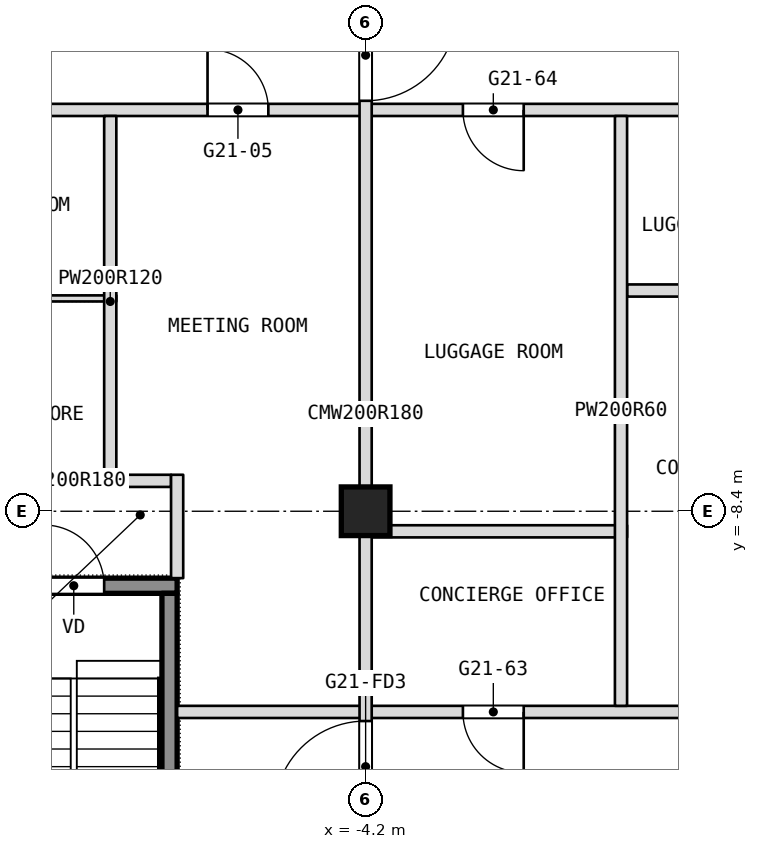
"""IFC4 building model, lengths in metres.
Left out: names, types, materials, properties, quantities, classifications, styles, units other than length and angle.
Written with IfcOpenShell. Run it as: python <this file> out.ifc"""

import sys

from ifc_helpers import new_model, si_unit, direction, frame, frame_2d, origin, origin_2d, place, context, subcontext, project, spatial, rectangle, extrude, element, fill, save


model = new_model("IFC4")
c1 = context("Model", 3, precision=1e-05, world=origin(), true_north=direction((0.0, 1.0)))
c2 = subcontext(c1, "Body", "Model", "MODEL_VIEW")
j1 = project(units=[si_unit("LENGTHUNIT", "METRE"), si_unit("PLANEANGLEUNIT", "RADIAN")], contexts=[c1])
p1 = place(None, origin())
s1 = spatial("IfcSite", under=j1, at=p1, CompositionType="ELEMENT")
p2 = place(p1, origin())
s2 = spatial("IfcBuilding", under=s1, at=p2, CompositionType="ELEMENT")
p3 = place(p2, frame((0.0, 0.0, 245.3)))
s3 = spatial("IfcBuildingStorey", under=s2, at=p3, CompositionType="ELEMENT", Elevation=245.3)
p4 = place(p3, frame((-4.2, -8.4, 0.0), z_axis=(0.0, 0.0, 1.0), x_axis=(1.0, 0.0, 0.0)))
e1 = element("IfcColumn", 1, at=p4, inside=s3, PredefinedType="COLUMN", context=c2, shape_type="SweptSolid", body=[
    extrude(rectangle(XDim=0.8, YDim=0.8, at=origin_2d()), origin(), (0.0, 0.0, 1.0), 3.6),
])
p5 = place(p3, frame((-7.3, -11.7, 0.0), z_axis=(0.0, 0.0, 1.0), x_axis=(1.0, 0.0, 0.0)))
e2 = element("IfcWall", 2, at=p5, inside=s3, PredefinedType="PARTITIONING", context=c2, shape_type="SweptSolid", body=[
    extrude(rectangle(XDim=14.6, YDim=0.2, at=frame_2d((7.3, 0.0))), origin(), (0.0, 0.0, 1.0), 3.34),
])
p6 = place(p5, frame((4.7, 0.0, 0.0)))
e3 = element("IfcOpeningElement", 3, at=p6, cuts=e2, PredefinedType="OPENING", context=c2, shape_type="SweptSolid", body=[
    extrude(rectangle(XDim=1.0, YDim=2.1, at=frame_2d((0.5, 1.05))), frame((0.0, 0.1, 0.0), z_axis=(0.0, -1.0, 0.0), x_axis=(1.0, 0.0, 0.0)), (0.0, 0.0, 1.0), 0.2),
])
p7 = place(p5, frame((8.9, 0.0, 0.0)))
e4 = element("IfcOpeningElement", 4, at=p7, cuts=e2, PredefinedType="OPENING", context=c2, shape_type="SweptSolid", body=[
    extrude(rectangle(XDim=1.0, YDim=2.1, at=frame_2d((0.5, 1.05))), frame((0.0, 0.1, 0.0), z_axis=(0.0, -1.0, 0.0), x_axis=(1.0, 0.0, 0.0)), (0.0, 0.0, 1.0), 0.2),
])
p8 = place(p3, frame((-4.1, -8.73, 0.0), z_axis=(0.0, 0.0, 1.0), x_axis=(1.0, 0.0, 0.0)))
e5 = element("IfcWall", 5, at=p8, inside=s3, PredefinedType="PARTITIONING", context=c2, shape_type="SweptSolid", body=[
    extrude(rectangle(XDim=4.2, YDim=0.2, at=frame_2d((2.1, 0.0))), origin(), (0.0, 0.0, 1.0), 3.34),
])
p9 = place(p3, frame((-10.6, -7.9, 0.0), z_axis=(0.0, 0.0, 1.0), x_axis=(1.0, 0.0, 0.0)))
e6 = element("IfcWall", 6, at=p9, inside=s3, PredefinedType="PARTITIONING", context=c2, shape_type="SweptSolid", body=[
    extrude(rectangle(XDim=3.2, YDim=0.2, at=frame_2d((1.6, 0.0))), origin(), (0.0, 0.0, 1.0), 3.34),
])
p10 = place(p3, frame((-12.5, -4.9, 0.0), z_axis=(0.0, 0.0, 1.0), x_axis=(1.0, 0.0, 0.0)))
e7 = element("IfcWall", 7, at=p10, inside=s3, PredefinedType="PARTITIONING", context=c2, shape_type="SweptSolid", body=[
    extrude(rectangle(XDim=4.2, YDim=0.1, at=frame_2d((2.1, 0.0))), origin(), (0.0, 0.0, 1.0), 3.34),
])
p11 = place(p10, frame((1.55, 0.0, 0.0)))
e8 = element("IfcOpeningElement", 8, at=p11, cuts=e7, PredefinedType="OPENING", context=c2, shape_type="SweptSolid", body=[
    extrude(rectangle(XDim=0.9, YDim=2.1, at=frame_2d((0.45, 1.05))), frame((0.0, 0.05, 0.0), z_axis=(0.0, -1.0, 0.0), x_axis=(1.0, 0.0, 0.0)), (0.0, 0.0, 1.0), 0.1),
])
p12 = place(p3, frame((0.1, -4.77, 0.0), z_axis=(0.0, 0.0, 1.0), x_axis=(1.0, 0.0, 0.0)))
e9 = element("IfcWall", 9, at=p12, inside=s3, PredefinedType="PARTITIONING", context=c2, shape_type="SweptSolid", body=[
    extrude(rectangle(XDim=4.0, YDim=0.2, at=frame_2d((2.0, 0.0))), origin(), (0.0, 0.0, 1.0), 3.34),
])
p13 = place(p3, frame((-16.9, -1.8, 0.0), z_axis=(0.0, 0.0, 1.0), x_axis=(1.0, 0.0, 0.0)))
e10 = element("IfcWall", 10, at=p13, inside=s3, PredefinedType="PARTITIONING", context=c2, shape_type="SweptSolid", body=[
    extrude(rectangle(XDim=33.8, YDim=0.2, at=frame_2d((16.9, 0.0))), origin(), (0.0, 0.0, 1.0), 3.34),
])
p14 = place(p13, frame((1.7, 0.0, 0.0)))
e11 = element("IfcOpeningElement", 11, at=p14, cuts=e10, PredefinedType="OPENING", context=c2, shape_type="SweptSolid", body=[
    extrude(rectangle(XDim=1.0, YDim=2.1, at=frame_2d((0.5, 1.05))), frame((0.0, 0.1, 0.0), z_axis=(0.0, -1.0, 0.0), x_axis=(1.0, 0.0, 0.0)), (0.0, 0.0, 1.0), 0.2),
])
p15 = place(p13, frame((5.9, 0.0, 0.0)))
e12 = element("IfcOpeningElement", 12, at=p15, cuts=e10, PredefinedType="OPENING", context=c2, shape_type="SweptSolid", body=[
    extrude(rectangle(XDim=1.0, YDim=2.1, at=frame_2d((0.5, 1.05))), frame((0.0, 0.1, 0.0), z_axis=(0.0, -1.0, 0.0), x_axis=(1.0, 0.0, 0.0)), (0.0, 0.0, 1.0), 0.2),
])
p16 = place(p13, frame((10.1, 0.0, 0.0)))
e13 = element("IfcOpeningElement", 13, at=p16, cuts=e10, PredefinedType="OPENING", context=c2, shape_type="SweptSolid", body=[
    extrude(rectangle(XDim=1.0, YDim=2.1, at=frame_2d((0.5, 1.05))), frame((0.0, 0.1, 0.0), z_axis=(0.0, -1.0, 0.0), x_axis=(1.0, 0.0, 0.0)), (0.0, 0.0, 1.0), 0.2),
])
p17 = place(p13, frame((24.4, 0.0, 0.0)))
e14 = element("IfcOpeningElement", 14, at=p17, cuts=e10, PredefinedType="OPENING", context=c2, shape_type="SweptSolid", body=[
    extrude(rectangle(XDim=1.8, YDim=2.1, at=frame_2d((0.9, 1.05))), frame((0.0, 0.1, 0.0), z_axis=(0.0, -1.0, 0.0), x_axis=(1.0, 0.0, 0.0)), (0.0, 0.0, 1.0), 0.2),
])
p18 = place(p13, frame((31.1, 0.0, 0.0)))
e15 = element("IfcOpeningElement", 15, at=p18, cuts=e10, PredefinedType="OPENING", context=c2, shape_type="SweptSolid", body=[
    extrude(rectangle(XDim=1.0, YDim=2.1, at=frame_2d((0.5, 1.05))), frame((0.0, 0.1, 0.0), z_axis=(0.0, -1.0, 0.0), x_axis=(1.0, 0.0, 0.0)), (0.0, 0.0, 1.0), 0.2),
])
p19 = place(p13, frame((14.3, 0.0, 0.0)))
e16 = element("IfcOpeningElement", 16, at=p19, cuts=e10, PredefinedType="OPENING", context=c2, shape_type="SweptSolid", body=[
    extrude(rectangle(XDim=1.0, YDim=2.1, at=frame_2d((0.5, 1.05))), frame((0.0, 0.1, 0.0), z_axis=(0.0, -1.0, 0.0), x_axis=(1.0, 0.0, 0.0)), (0.0, 0.0, 1.0), 0.2),
])
p20 = place(p13, frame((18.5, 0.0, 0.0)))
e17 = element("IfcOpeningElement", 17, at=p20, cuts=e10, PredefinedType="OPENING", context=c2, shape_type="SweptSolid", body=[
    extrude(rectangle(XDim=1.0, YDim=2.1, at=frame_2d((0.5, 1.05))), frame((0.0, 0.1, 0.0), z_axis=(0.0, -1.0, 0.0), x_axis=(1.0, 0.0, 0.0)), (0.0, 0.0, 1.0), 0.2),
])
p21 = place(p3, frame((0.0, -11.6, 0.0), z_axis=(0.0, 0.0, 1.0), x_axis=(0.0, 1.0, 0.0)))
e18 = element("IfcWall", 18, at=p21, inside=s3, PredefinedType="PARTITIONING", context=c2, shape_type="SweptSolid", body=[
    extrude(rectangle(XDim=9.7, YDim=0.2, at=frame_2d((4.85, 0.0))), origin(), (0.0, 0.0, 1.0), 3.34),
])
p22 = place(p3, frame((-4.2, -13.6, 0.0), z_axis=(0.0, 0.0, 1.0), x_axis=(0.0, 1.0, 0.0)))
e19 = element("IfcWall", 19, at=p22, inside=s3, PredefinedType="PARTITIONING", context=c2, shape_type="SweptSolid", body=[
    extrude(rectangle(XDim=13.6, YDim=0.2, at=frame_2d((6.8, 0.0))), origin(), (0.0, 0.0, 1.0), 3.34),
])
p23 = place(p22, frame((11.95, 0.0, 0.0)))
e20 = element("IfcOpeningElement", 20, at=p23, cuts=e19, PredefinedType="OPENING", context=c2, shape_type="SweptSolid", body=[
    extrude(rectangle(XDim=1.5, YDim=2.1, at=frame_2d((0.75, 1.05))), frame((0.0, 0.1, 0.0), z_axis=(0.0, -1.0, 0.0), x_axis=(1.0, 0.0, 0.0)), (0.0, 0.0, 1.0), 0.2),
])
p24 = place(p22, frame((0.25, 0.0, 0.0)))
e21 = element("IfcOpeningElement", 21, at=p24, cuts=e19, PredefinedType="OPENING", context=c2, shape_type="SweptSolid", body=[
    extrude(rectangle(XDim=1.5, YDim=2.1, at=frame_2d((0.75, 1.05))), frame((0.0, 0.1, 0.0), z_axis=(0.0, -1.0, 0.0), x_axis=(1.0, 0.0, 0.0)), (0.0, 0.0, 1.0), 0.2),
])
p25 = place(p3, frame((-7.3, -9.5, 0.0), z_axis=(0.0, 0.0, 1.0), x_axis=(0.0, 1.0, 0.0)))
e22 = element("IfcWall", 22, at=p25, inside=s3, PredefinedType="PARTITIONING", context=c2, shape_type="SweptSolid", body=[
    extrude(rectangle(XDim=1.7, YDim=0.2, at=frame_2d((0.85, 0.0))), origin(), (0.0, 0.0, 1.0), 3.34),
])
p26 = place(p3, frame((-8.4, -8.0, 0.0), z_axis=(0.0, 0.0, 1.0), x_axis=(0.0, 1.0, 0.0)))
e23 = element("IfcWall", 23, at=p26, inside=s3, PredefinedType="PARTITIONING", context=c2, shape_type="SweptSolid", body=[
    extrude(rectangle(XDim=6.1, YDim=0.2, at=frame_2d((3.05, 0.0))), origin(), (0.0, 0.0, 1.0), 3.34),
])
p27 = place(p3, frame((-10.7, -9.625, 0.1), z_axis=(0.0, 0.0, 1.0), x_axis=(1.0, 0.0, 0.0)))
e24 = element("IfcWall", 24, at=p27, inside=s3, PredefinedType="SHEAR", context=c2, shape_type="SweptSolid", body=[
    extrude(rectangle(XDim=3.4, YDim=0.25, at=frame_2d((1.7, 0.0))), origin(), (0.0, 0.0, 1.0), 3.6),
])
p28 = place(p27, frame((1.2, 0.0, 0.0)))
e25 = element("IfcOpeningElement", 25, at=p28, cuts=e24, PredefinedType="OPENING", context=c2, shape_type="SweptSolid", body=[
    extrude(rectangle(XDim=1.0, YDim=2.1, at=frame_2d((0.5, 1.05))), frame((0.0, 0.125, 0.0), z_axis=(0.0, -1.0, 0.0), x_axis=(1.0, 0.0, 0.0)), (0.0, 0.0, 1.0), 0.25),
])
p29 = place(p3, frame((-7.425, -15.45, 0.1), z_axis=(0.0, 0.0, 1.0), x_axis=(0.0, 1.0, 0.0)))
e26 = element("IfcWall", 26, at=p29, inside=s3, PredefinedType="SHEAR", context=c2, shape_type="SweptSolid", body=[
    extrude(rectangle(XDim=5.7, YDim=0.25, at=frame_2d((2.85, 0.0))), origin(), (0.0, 0.0, 1.0), 3.6),
])
p30 = place(p6, origin())
e27 = element("IfcDoor", 27, at=p30, inside=s3, OperationType="SINGLE_SWING_LEFT", PredefinedType="DOOR", context=c2, shape_type="SweptSolid", body=[
    extrude(rectangle(XDim=1.0, YDim=2.1, at=frame_2d((0.5, 1.05))), frame((0.0, 0.025, 0.0), z_axis=(0.0, -1.0, 0.0), x_axis=(1.0, 0.0, 0.0)), (0.0, 0.0, 1.0), 0.05),
])
fill(e3, e27)
p31 = place(p16, origin())
e28 = element("IfcDoor", 28, at=p31, inside=s3, OperationType="SINGLE_SWING_RIGHT", PredefinedType="DOOR", context=c2, shape_type="SweptSolid", body=[
    extrude(rectangle(XDim=1.0, YDim=2.1, at=frame_2d((0.5, 1.05))), frame((0.0, 0.025, 0.0), z_axis=(0.0, -1.0, 0.0), x_axis=(1.0, 0.0, 0.0)), (0.0, 0.0, 1.0), 0.05),
])
fill(e13, e28)
p32 = place(p19, origin())
e29 = element("IfcDoor", 29, at=p32, inside=s3, OperationType="SINGLE_SWING_LEFT", PredefinedType="DOOR", context=c2, shape_type="SweptSolid", body=[
    extrude(rectangle(XDim=1.0, YDim=2.1, at=frame_2d((0.5, 1.05))), frame((0.0, 0.025, 0.0), z_axis=(0.0, -1.0, 0.0), x_axis=(1.0, 0.0, 0.0)), (0.0, 0.0, 1.0), 0.05),
])
fill(e16, e29)
p33 = place(p28, origin())
e30 = element("IfcDoor", 30, at=p33, inside=s3, OperationType="SINGLE_SWING_LEFT", PredefinedType="DOOR", context=c2, shape_type="SweptSolid", body=[
    extrude(rectangle(XDim=1.0, YDim=2.1, at=frame_2d((0.5, 1.05))), frame((0.0, 0.025, 0.0), z_axis=(0.0, -1.0, 0.0), x_axis=(1.0, 0.0, 0.0)), (0.0, 0.0, 1.0), 0.05),
])
fill(e25, e30)
p34 = place(p23, origin())
e31 = element("IfcDoor", 31, at=p34, inside=s3, OperationType="DOUBLE_DOOR_DOUBLE_SWING", PredefinedType="DOOR", context=c2, shape_type="SweptSolid", body=[
    extrude(rectangle(XDim=1.5, YDim=2.1, at=frame_2d((0.75, 1.05))), frame((0.0, 0.025, 0.0), z_axis=(0.0, -1.0, 0.0), x_axis=(1.0, 0.0, 0.0)), (0.0, 0.0, 1.0), 0.05),
])
fill(e20, e31)
p35 = place(p24, origin())
e32 = element("IfcDoor", 32, at=p35, inside=s3, OperationType="DOUBLE_DOOR_DOUBLE_SWING", PredefinedType="DOOR", context=c2, shape_type="SweptSolid", body=[
    extrude(rectangle(XDim=1.5, YDim=2.1, at=frame_2d((0.75, 1.05))), frame((0.0, 0.025, 0.0), z_axis=(0.0, -1.0, 0.0), x_axis=(1.0, 0.0, 0.0)), (0.0, 0.0, 1.0), 0.05),
])
fill(e21, e32)
save(model, sys.argv[1])
